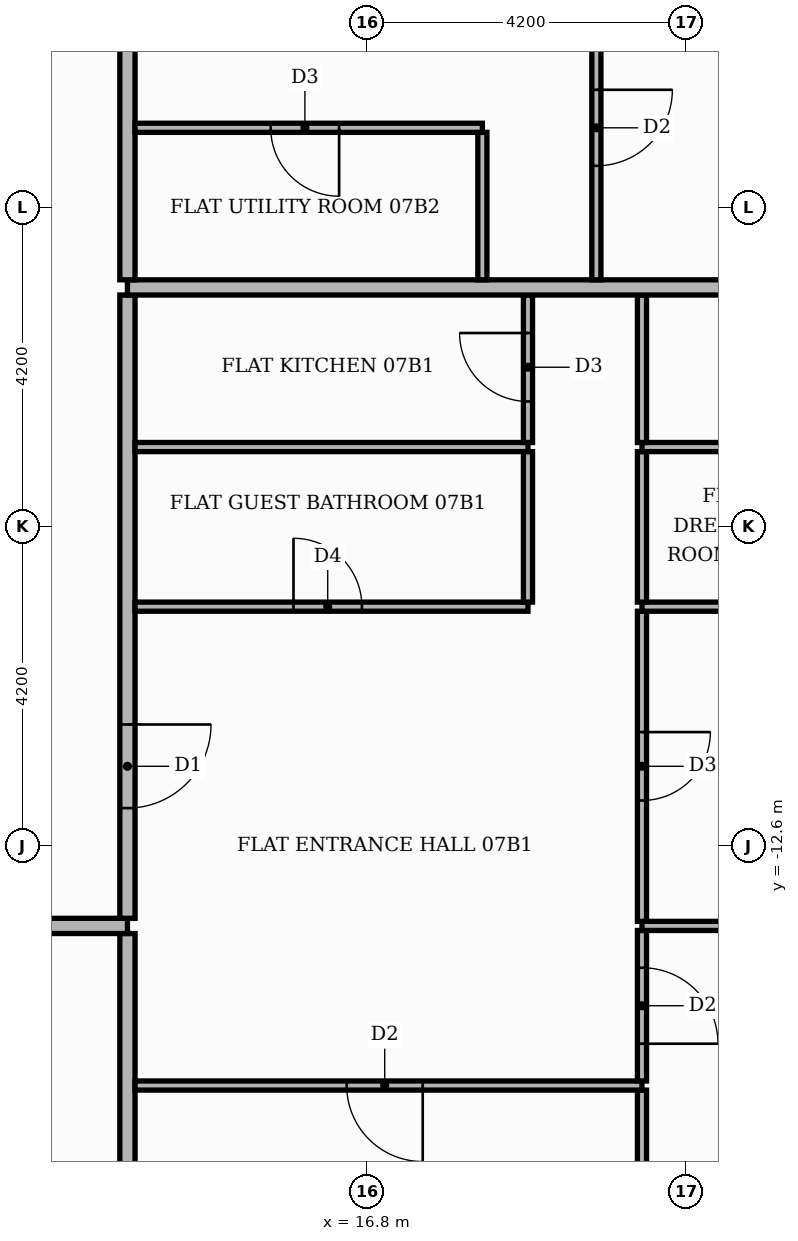
"""IFC4 building model, lengths in metres.
Left out: names, types, materials, properties, quantities, classifications, styles, units other than length and angle.
Written with IfcOpenShell. Run it as: python <this file> out.ifc"""

import sys

from ifc_helpers import new_model, si_unit, direction, frame, frame_2d, origin, place, context, subcontext, project, spatial, rectangle, extrude, element, fill, save


model = new_model("IFC4")
c1 = context("Model", 3, precision=1e-05, world=origin(), true_north=direction((0.0, 1.0)))
c2 = subcontext(c1, "Body", "Model", "MODEL_VIEW")
j1 = project(units=[si_unit("LENGTHUNIT", "METRE"), si_unit("PLANEANGLEUNIT", "RADIAN")], contexts=[c1])
p1 = place(None, origin())
s1 = spatial("IfcSite", under=j1, at=p1, CompositionType="ELEMENT")
p2 = place(p1, origin())
s2 = spatial("IfcBuilding", under=s1, at=p2, CompositionType="ELEMENT")
p3 = place(p2, frame((0.0, 0.0, 34.8)))
s3 = spatial("IfcBuildingStorey", under=s2, at=p3, CompositionType="ELEMENT", Elevation=34.8)
p4 = place(p3, frame((13.65, -25.42, 0.0), z_axis=(0.0, 0.0, 1.0), x_axis=(0.0, 1.0, 0.0)))
e1 = element("IfcWall", 1, at=p4, inside=s3, PredefinedType="PARTITIONING", context=c2, shape_type="SweptSolid", body=[
    extrude(rectangle(XDim=11.67, YDim=0.2, at=frame_2d((5.835, 0.0))), origin(), (0.0, 0.0, 1.0), 3.48),
])
p5 = place(p3, frame((20.42, -25.42, 0.0), z_axis=(0.0, 0.0, 1.0), x_axis=(0.0, 1.0, 0.0)))
e2 = element("IfcWall", 2, at=p5, inside=s3, PredefinedType="PARTITIONING", context=c2, shape_type="SweptSolid", body=[
    extrude(rectangle(XDim=9.61, YDim=0.12, at=frame_2d((4.805, 0.0))), origin(), (0.0, 0.0, 1.0), 3.48),
])
p6 = place(p3, frame((13.75, -15.75, 0.0), z_axis=(0.0, 0.0, 1.0), x_axis=(1.0, 0.0, 0.0)))
e3 = element("IfcWall", 3, at=p6, inside=s3, PredefinedType="PARTITIONING", context=c2, shape_type="SweptSolid", body=[
    extrude(rectangle(XDim=6.67, YDim=0.12, at=frame_2d((3.335, 0.0))), origin(), (0.0, 0.0, 1.0), 3.48),
])
p7 = place(p6, frame((2.785, 0.0, 0.0)))
e4 = element("IfcOpeningElement", 4, at=p7, cuts=e3, PredefinedType="OPENING", context=c2, shape_type="SweptSolid", body=[
    extrude(rectangle(XDim=1.0, YDim=2.1, at=frame_2d((0.5, 1.05))), frame((0.0, 0.07, 0.0), z_axis=(0.0, -1.0, 0.0), x_axis=(1.0, 0.0, 0.0)), (0.0, 0.0, 1.0), 0.14),
])
p8 = place(p3, frame((20.42, -15.69, 0.0), z_axis=(0.0, 0.0, 1.0), x_axis=(0.0, 1.0, 0.0)))
e5 = element("IfcWall", 5, at=p8, inside=s3, PredefinedType="PARTITIONING", context=c2, shape_type="SweptSolid", body=[
    extrude(rectangle(XDim=1.98, YDim=0.12, at=frame_2d((0.99, 0.0))), origin(), (0.0, 0.0, 1.0), 3.48),
])
p9 = place(p8, frame((0.49, 0.0, 0.0)))
e6 = element("IfcOpeningElement", 6, at=p9, cuts=e5, PredefinedType="OPENING", context=c2, shape_type="SweptSolid", body=[
    extrude(rectangle(XDim=1.0, YDim=2.1, at=frame_2d((0.5, 1.05))), frame((0.0, 0.07, 0.0), z_axis=(0.0, -1.0, 0.0), x_axis=(1.0, 0.0, 0.0)), (0.0, 0.0, 1.0), 0.14),
])
p10 = place(p3, frame((-25.42, -13.65, 0.0), z_axis=(0.0, 0.0, 1.0), x_axis=(1.0, 0.0, 0.0)))
e7 = element("IfcWall", 7, at=p10, inside=s3, PredefinedType="PARTITIONING", context=c2, shape_type="SweptSolid", body=[
    extrude(rectangle(XDim=39.07, YDim=0.2, at=frame_2d((19.535, 0.0))), origin(), (0.0, 0.0, 1.0), 3.48),
])
p11 = place(p10, frame((14.37, 0.0, 0.0)))
e8 = element("IfcOpeningElement", 8, at=p11, cuts=e7, PredefinedType="OPENING", context=c2, shape_type="SweptSolid", body=[
    extrude(rectangle(XDim=1.1, YDim=2.4, at=frame_2d((0.55, 1.2))), frame((0.0, 0.11, 0.0), z_axis=(0.0, -1.0, 0.0), x_axis=(1.0, 0.0, 0.0)), (0.0, 0.0, 1.0), 0.22),
])
p12 = place(p3, frame((20.42, -13.65, 0.0), z_axis=(0.0, 0.0, 1.0), x_axis=(1.0, 0.0, 0.0)))
e9 = element("IfcWall", 9, at=p12, inside=s3, PredefinedType="PARTITIONING", context=c2, shape_type="SweptSolid", body=[
    extrude(rectangle(XDim=5.0, YDim=0.12, at=frame_2d((2.5, 0.0))), origin(), (0.0, 0.0, 1.0), 3.48),
])
p13 = place(p3, frame((20.42, -13.59, 0.0), z_axis=(0.0, 0.0, 1.0), x_axis=(0.0, 1.0, 0.0)))
e10 = element("IfcWall", 10, at=p13, inside=s3, PredefinedType="PARTITIONING", context=c2, shape_type="SweptSolid", body=[
    extrude(rectangle(XDim=4.08, YDim=0.12, at=frame_2d((2.04, 0.0))), origin(), (0.0, 0.0, 1.0), 3.48),
])
p14 = place(p13, frame((1.59, 0.0, 0.0)))
e11 = element("IfcOpeningElement", 11, at=p14, cuts=e10, PredefinedType="OPENING", context=c2, shape_type="SweptSolid", body=[
    extrude(rectangle(XDim=0.9, YDim=2.1, at=frame_2d((0.45, 1.05))), frame((0.0, 0.07, 0.0), z_axis=(0.0, -1.0, 0.0), x_axis=(1.0, 0.0, 0.0)), (0.0, 0.0, 1.0), 0.14),
])
p15 = place(p3, frame((13.65, -13.55, 0.0), z_axis=(0.0, 0.0, 1.0), x_axis=(0.0, 1.0, 0.0)))
e12 = element("IfcWall", 12, at=p15, inside=s3, PredefinedType="PARTITIONING", context=c2, shape_type="SweptSolid", body=[
    extrude(rectangle(XDim=8.2, YDim=0.2, at=frame_2d((4.1, 0.0))), origin(), (0.0, 0.0, 1.0), 3.48),
])
p16 = place(p15, frame((1.45, 0.0, 0.0)))
e13 = element("IfcOpeningElement", 13, at=p16, cuts=e12, PredefinedType="OPENING", context=c2, shape_type="SweptSolid", body=[
    extrude(rectangle(XDim=1.1, YDim=2.4, at=frame_2d((0.55, 1.2))), frame((0.0, 0.11, 0.0), z_axis=(0.0, -1.0, 0.0), x_axis=(1.0, 0.0, 0.0)), (0.0, 0.0, 1.0), 0.22),
])
p17 = place(p3, frame((13.75, -9.45, 0.0), z_axis=(0.0, 0.0, 1.0), x_axis=(1.0, 0.0, 0.0)))
e14 = element("IfcWall", 14, at=p17, inside=s3, PredefinedType="PARTITIONING", context=c2, shape_type="SweptSolid", body=[
    extrude(rectangle(XDim=5.17, YDim=0.12, at=frame_2d((2.585, 0.0))), origin(), (0.0, 0.0, 1.0), 3.48),
])
p18 = place(p17, frame((2.085, 0.0, 0.0)))
e15 = element("IfcOpeningElement", 15, at=p18, cuts=e14, PredefinedType="OPENING", context=c2, shape_type="SweptSolid", body=[
    extrude(rectangle(XDim=0.9, YDim=2.1, at=frame_2d((0.45, 1.05))), frame((0.0, 0.07, 0.0), z_axis=(0.0, -1.0, 0.0), x_axis=(1.0, 0.0, 0.0)), (0.0, 0.0, 1.0), 0.14),
])
p19 = place(p3, frame((20.42, -9.45, 0.0), z_axis=(0.0, 0.0, 1.0), x_axis=(1.0, 0.0, 0.0)))
e16 = element("IfcWall", 16, at=p19, inside=s3, PredefinedType="PARTITIONING", context=c2, shape_type="SweptSolid", body=[
    extrude(rectangle(XDim=5.0, YDim=0.12, at=frame_2d((2.5, 0.0))), origin(), (0.0, 0.0, 1.0), 3.48),
])
p20 = place(p19, frame((2.2, 0.0, 0.0)))
e17 = element("IfcOpeningElement", 17, at=p20, cuts=e16, PredefinedType="OPENING", context=c2, shape_type="SweptSolid", body=[
    extrude(rectangle(XDim=0.9, YDim=2.1, at=frame_2d((0.45, 1.05))), frame((0.0, 0.07, 0.0), z_axis=(0.0, -1.0, 0.0), x_axis=(1.0, 0.0, 0.0)), (0.0, 0.0, 1.0), 0.14),
])
for number, where, z_axis, x_axis in (
    (18, (18.92, -9.39, 0.0), (0.0, 0.0, 1.0), (0.0, 1.0, 0.0)),
    (19, (20.42, -9.39, 0.0), (0.0, 0.0, 1.0), (0.0, 1.0, 0.0)),
):
    element("IfcWall", number, at=place(p3, frame(where, z_axis=z_axis, x_axis=x_axis)), inside=s3, PredefinedType="PARTITIONING", context=c2, shape_type="SweptSolid", body=[
        extrude(rectangle(XDim=1.98, YDim=0.12, at=frame_2d((0.99, 0.0))), origin(), (0.0, 0.0, 1.0), 3.48),
    ])
p21 = place(p3, frame((13.75, -7.35, 0.0), z_axis=(0.0, 0.0, 1.0), x_axis=(1.0, 0.0, 0.0)))
e20 = element("IfcWall", 20, at=p21, inside=s3, PredefinedType="PARTITIONING", context=c2, shape_type="SweptSolid", body=[
    extrude(rectangle(XDim=5.17, YDim=0.12, at=frame_2d((2.585, 0.0))), origin(), (0.0, 0.0, 1.0), 3.48),
])
p22 = place(p3, frame((20.42, -7.35, 0.0), z_axis=(0.0, 0.0, 1.0), x_axis=(1.0, 0.0, 0.0)))
e21 = element("IfcWall", 21, at=p22, inside=s3, PredefinedType="PARTITIONING", context=c2, shape_type="SweptSolid", body=[
    extrude(rectangle(XDim=5.0, YDim=0.12, at=frame_2d((2.5, 0.0))), origin(), (0.0, 0.0, 1.0), 3.48),
])
p23 = place(p22, frame((2.2, 0.0, 0.0)))
e22 = element("IfcOpeningElement", 22, at=p23, cuts=e21, PredefinedType="OPENING", context=c2, shape_type="SweptSolid", body=[
    extrude(rectangle(XDim=0.9, YDim=2.1, at=frame_2d((0.45, 1.05))), frame((0.0, 0.07, 0.0), z_axis=(0.0, -1.0, 0.0), x_axis=(1.0, 0.0, 0.0)), (0.0, 0.0, 1.0), 0.14),
])
p24 = place(p3, frame((18.92, -7.29, 0.0), z_axis=(0.0, 0.0, 1.0), x_axis=(0.0, 1.0, 0.0)))
e23 = element("IfcWall", 23, at=p24, inside=s3, PredefinedType="PARTITIONING", context=c2, shape_type="SweptSolid", body=[
    extrude(rectangle(XDim=1.94, YDim=0.12, at=frame_2d((0.97, 0.0))), origin(), (0.0, 0.0, 1.0), 3.48),
])
p25 = place(p24, frame((0.54, 0.0, 0.0)))
e24 = element("IfcOpeningElement", 24, at=p25, cuts=e23, PredefinedType="OPENING", context=c2, shape_type="SweptSolid", body=[
    extrude(rectangle(XDim=0.9, YDim=2.1, at=frame_2d((0.45, 1.05))), frame((0.0, 0.07, 0.0), z_axis=(0.0, -1.0, 0.0), x_axis=(1.0, 0.0, 0.0)), (0.0, 0.0, 1.0), 0.14),
])
p26 = place(p3, frame((20.42, -7.29, 0.0), z_axis=(0.0, 0.0, 1.0), x_axis=(0.0, 1.0, 0.0)))
e25 = element("IfcWall", 25, at=p26, inside=s3, PredefinedType="PARTITIONING", context=c2, shape_type="SweptSolid", body=[
    extrude(rectangle(XDim=1.94, YDim=0.12, at=frame_2d((0.97, 0.0))), origin(), (0.0, 0.0, 1.0), 3.48),
])
p27 = place(p3, frame((13.65, -5.25, 0.0), z_axis=(0.0, 0.0, 1.0), x_axis=(1.0, 0.0, 0.0)))
e26 = element("IfcWall", 26, at=p27, inside=s3, PredefinedType="PARTITIONING", context=c2, shape_type="SweptSolid", body=[
    extrude(rectangle(XDim=11.77, YDim=0.2, at=frame_2d((5.885, 0.0))), origin(), (0.0, 0.0, 1.0), 3.48),
])
p28 = place(p3, frame((13.65, -5.15, 0.0), z_axis=(0.0, 0.0, 1.0), x_axis=(0.0, 1.0, 0.0)))
e27 = element("IfcWall", 27, at=p28, inside=s3, PredefinedType="PARTITIONING", context=c2, shape_type="SweptSolid", body=[
    extrude(rectangle(XDim=18.7, YDim=0.2, at=frame_2d((9.35, 0.0))), origin(), (0.0, 0.0, 1.0), 3.48),
])
p29 = place(p28, frame((3.55, 0.0, 0.0)))
e28 = element("IfcOpeningElement", 28, at=p29, cuts=e27, PredefinedType="OPENING", context=c2, shape_type="SweptSolid", body=[
    extrude(rectangle(XDim=1.1, YDim=2.4, at=frame_2d((0.55, 1.2))), frame((0.0, 0.11, 0.0), z_axis=(0.0, -1.0, 0.0), x_axis=(1.0, 0.0, 0.0)), (0.0, 0.0, 1.0), 0.22),
])
p30 = place(p3, frame((18.32, -5.15, 0.0), z_axis=(0.0, 0.0, 1.0), x_axis=(0.0, 1.0, 0.0)))
e29 = element("IfcWall", 29, at=p30, inside=s3, PredefinedType="PARTITIONING", context=c2, shape_type="SweptSolid", body=[
    extrude(rectangle(XDim=1.94, YDim=0.12, at=frame_2d((0.97, 0.0))), origin(), (0.0, 0.0, 1.0), 3.48),
])
p31 = place(p3, frame((19.82, -5.15, 0.0), z_axis=(0.0, 0.0, 1.0), x_axis=(0.0, 1.0, 0.0)))
e30 = element("IfcWall", 30, at=p31, inside=s3, PredefinedType="PARTITIONING", context=c2, shape_type="SweptSolid", body=[
    extrude(rectangle(XDim=4.04, YDim=0.12, at=frame_2d((2.02, 0.0))), origin(), (0.0, 0.0, 1.0), 3.48),
])
p32 = place(p31, frame((1.5, 0.0, 0.0)))
e31 = element("IfcOpeningElement", 31, at=p32, cuts=e30, PredefinedType="OPENING", context=c2, shape_type="SweptSolid", body=[
    extrude(rectangle(XDim=1.0, YDim=2.1, at=frame_2d((0.5, 1.05))), frame((0.0, 0.07, 0.0), z_axis=(0.0, -1.0, 0.0), x_axis=(1.0, 0.0, 0.0)), (0.0, 0.0, 1.0), 0.14),
])
p33 = place(p3, frame((13.75, -3.15, 0.0), z_axis=(0.0, 0.0, 1.0), x_axis=(1.0, 0.0, 0.0)))
e32 = element("IfcWall", 32, at=p33, inside=s3, PredefinedType="PARTITIONING", context=c2, shape_type="SweptSolid", body=[
    extrude(rectangle(XDim=4.57, YDim=0.12, at=frame_2d((2.285, 0.0))), origin(), (0.0, 0.0, 1.0), 3.48),
])
p34 = place(p33, frame((1.785, 0.0, 0.0)))
e33 = element("IfcOpeningElement", 33, at=p34, cuts=e32, PredefinedType="OPENING", context=c2, shape_type="SweptSolid", body=[
    extrude(rectangle(XDim=0.9, YDim=2.1, at=frame_2d((0.45, 1.05))), frame((0.0, 0.07, 0.0), z_axis=(0.0, -1.0, 0.0), x_axis=(1.0, 0.0, 0.0)), (0.0, 0.0, 1.0), 0.14),
])
p35 = place(p16, frame((1.1, 0.0, 0.0), z_axis=(0.0, 0.0, 1.0), x_axis=(-1.0, 0.0, 0.0)))
e34 = element("IfcDoor", 34, at=p35, inside=s3, OperationType="SINGLE_SWING_RIGHT", PredefinedType="DOOR", context=c2, shape_type="SweptSolid", body=[
    extrude(rectangle(XDim=1.1, YDim=2.4, at=frame_2d((0.55, 1.2))), frame((0.0, 0.025, 0.0), z_axis=(0.0, -1.0, 0.0), x_axis=(1.0, 0.0, 0.0)), (0.0, 0.0, 1.0), 0.05),
])
fill(e13, e34)
p36 = place(p7, frame((1.0, 0.0, 0.0), z_axis=(0.0, 0.0, 1.0), x_axis=(-1.0, 0.0, 0.0)))
e35 = element("IfcDoor", 35, at=p36, inside=s3, OperationType="SINGLE_SWING_RIGHT", PredefinedType="DOOR", context=c2, shape_type="SweptSolid", body=[
    extrude(rectangle(XDim=1.0, YDim=2.1, at=frame_2d((0.5, 1.05))), frame((0.0, 0.025, 0.0), z_axis=(0.0, -1.0, 0.0), x_axis=(1.0, 0.0, 0.0)), (0.0, 0.0, 1.0), 0.05),
])
fill(e4, e35)
p37 = place(p18, origin())
e36 = element("IfcDoor", 36, at=p37, inside=s3, OperationType="SINGLE_SWING_LEFT", PredefinedType="DOOR", context=c2, shape_type="SweptSolid", body=[
    extrude(rectangle(XDim=0.9, YDim=2.1, at=frame_2d((0.45, 1.05))), frame((0.0, 0.025, 0.0), z_axis=(0.0, -1.0, 0.0), x_axis=(1.0, 0.0, 0.0)), (0.0, 0.0, 1.0), 0.05),
])
fill(e15, e36)
p38 = place(p25, origin())
e37 = element("IfcDoor", 37, at=p38, inside=s3, OperationType="SINGLE_SWING_RIGHT", PredefinedType="DOOR", context=c2, shape_type="SweptSolid", body=[
    extrude(rectangle(XDim=0.9, YDim=2.1, at=frame_2d((0.45, 1.05))), frame((0.0, 0.025, 0.0), z_axis=(0.0, -1.0, 0.0), x_axis=(1.0, 0.0, 0.0)), (0.0, 0.0, 1.0), 0.05),
])
fill(e24, e37)
p39 = place(p9, frame((1.0, 0.0, 0.0), z_axis=(0.0, 0.0, 1.0), x_axis=(-1.0, 0.0, 0.0)))
e38 = element("IfcDoor", 38, at=p39, inside=s3, OperationType="SINGLE_SWING_LEFT", PredefinedType="DOOR", context=c2, shape_type="SweptSolid", body=[
    extrude(rectangle(XDim=1.0, YDim=2.1, at=frame_2d((0.5, 1.05))), frame((0.0, 0.025, 0.0), z_axis=(0.0, -1.0, 0.0), x_axis=(1.0, 0.0, 0.0)), (0.0, 0.0, 1.0), 0.05),
])
fill(e6, e38)
p40 = place(p14, frame((0.9, 0.0, 0.0), z_axis=(0.0, 0.0, 1.0), x_axis=(-1.0, 0.0, 0.0)))
e39 = element("IfcDoor", 39, at=p40, inside=s3, OperationType="SINGLE_SWING_RIGHT", PredefinedType="DOOR", context=c2, shape_type="SweptSolid", body=[
    extrude(rectangle(XDim=0.9, YDim=2.1, at=frame_2d((0.45, 1.05))), frame((0.0, 0.025, 0.0), z_axis=(0.0, -1.0, 0.0), x_axis=(1.0, 0.0, 0.0)), (0.0, 0.0, 1.0), 0.05),
])
fill(e11, e39)
p41 = place(p34, frame((0.9, 0.0, 0.0), z_axis=(0.0, 0.0, 1.0), x_axis=(-1.0, 0.0, 0.0)))
e40 = element("IfcDoor", 40, at=p41, inside=s3, OperationType="SINGLE_SWING_RIGHT", PredefinedType="DOOR", context=c2, shape_type="SweptSolid", body=[
    extrude(rectangle(XDim=0.9, YDim=2.1, at=frame_2d((0.45, 1.05))), frame((0.0, 0.025, 0.0), z_axis=(0.0, -1.0, 0.0), x_axis=(1.0, 0.0, 0.0)), (0.0, 0.0, 1.0), 0.05),
])
fill(e33, e40)
p42 = place(p32, frame((1.0, 0.0, 0.0), z_axis=(0.0, 0.0, 1.0), x_axis=(-1.0, 0.0, 0.0)))
e41 = element("IfcDoor", 41, at=p42, inside=s3, OperationType="SINGLE_SWING_RIGHT", PredefinedType="DOOR", context=c2, shape_type="SweptSolid", body=[
    extrude(rectangle(XDim=1.0, YDim=2.1, at=frame_2d((0.5, 1.05))), frame((0.0, 0.025, 0.0), z_axis=(0.0, -1.0, 0.0), x_axis=(1.0, 0.0, 0.0)), (0.0, 0.0, 1.0), 0.05),
])
fill(e31, e41)
save(model, sys.argv[1])
